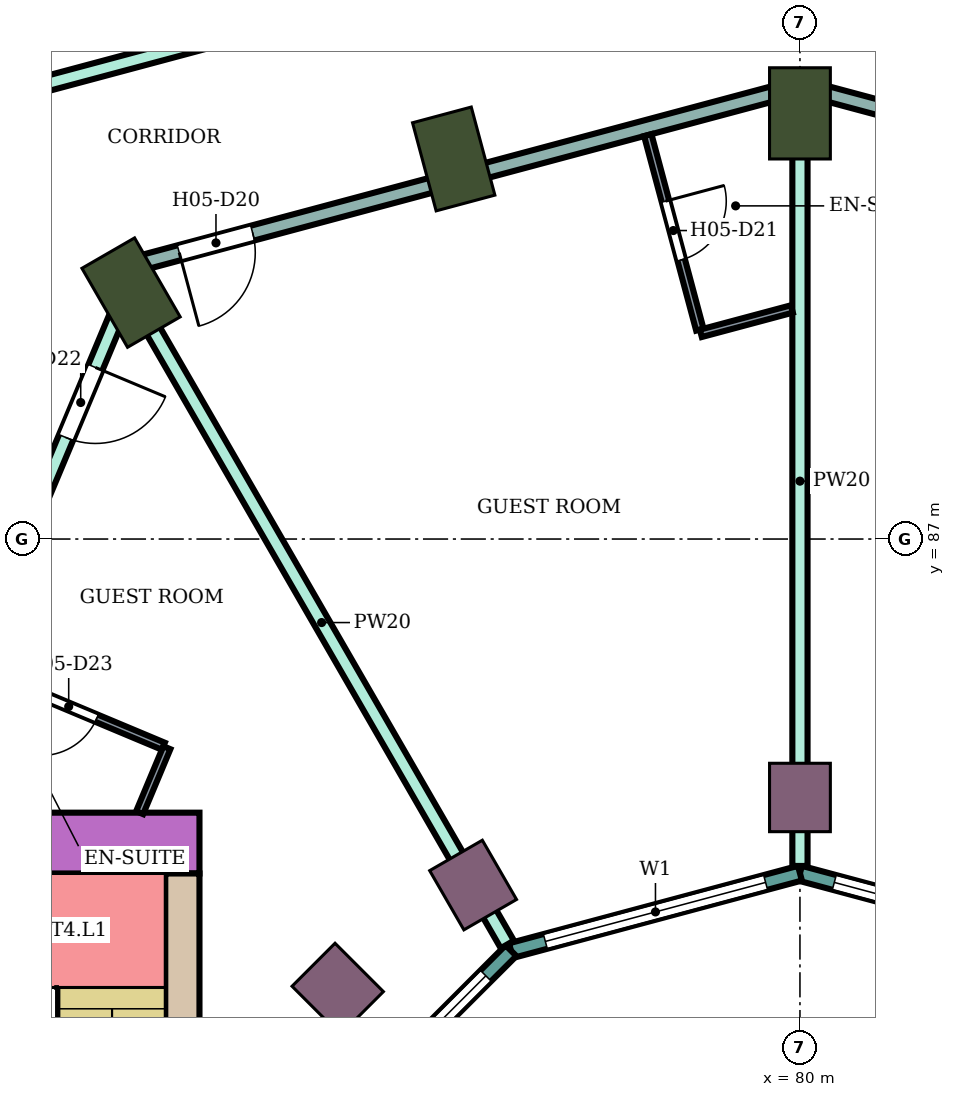
"""IFC4 building model, lengths in metres.
Left out: names, types, materials, properties, quantities, classifications, styles, units other than length and angle.
Written with IfcOpenShell. Run it as: python <this file> out.ifc"""

import sys

from ifc_helpers import new_model, si_unit, direction, frame, frame_2d, origin, origin_2d, place, context, subcontext, project, spatial, rectangle, extrude, element, fill, save


model = new_model("IFC4")
c1 = context("Model", 3, precision=1e-05, world=origin(), true_north=direction((0.0, 1.0)))
c2 = subcontext(c1, "Body", "Model", "MODEL_VIEW")
j1 = project(units=[si_unit("LENGTHUNIT", "METRE"), si_unit("PLANEANGLEUNIT", "RADIAN")], contexts=[c1])
p1 = place(None, origin())
s1 = spatial("IfcSite", under=j1, at=p1, CompositionType="ELEMENT")
p2 = place(p1, origin())
s2 = spatial("IfcBuilding", under=s1, at=p2, CompositionType="ELEMENT")
p3 = place(p2, frame((0.0, 0.0, 86.2)))
s3 = spatial("IfcBuildingStorey", under=s2, at=p3, CompositionType="ELEMENT", Elevation=86.2)
for number, where, z_axis, x_axis in (
    (1, (80.0, 92.6, 0.0), (0.0, 0.0, 1.0), (0.0, 1.0, 0.0)),
    (2, (75.445, 92.0, 0.0), (0.0, 0.0, 1.0), (-0.259, 0.966, 0.0)),
    (3, (71.2, 90.242, 0.0), (0.0, 0.0, 1.0), (-0.5, 0.866, 0.0)),
):
    element("IfcColumn", number, at=place(p3, frame(where, z_axis=z_axis, x_axis=x_axis)), inside=s3, PredefinedType="COLUMN", context=c2, shape_type="SweptSolid", body=[
        extrude(rectangle(XDim=1.2, YDim=0.8, at=origin_2d()), origin(), (0.0, 0.0, 1.0), 3.8),
    ])
for number, where, z_axis, x_axis in (
    (4, (80.0, 83.6, 0.0), (0.0, 0.0, 1.0), (0.0, 1.0, 0.0)),
    (5, (75.7, 82.448, 0.0), (0.0, 0.0, 1.0), (-0.5, 0.866, 0.0)),
    (6, (73.919, 81.081, 0.0), (0.0, 0.0, 1.0), (-0.707, 0.707, 0.0)),
):
    element("IfcColumn", number, at=place(p3, frame(where, z_axis=z_axis, x_axis=x_axis)), inside=s3, PredefinedType="COLUMN", context=c2, shape_type="SweptSolid", body=[
        extrude(rectangle(XDim=0.9, YDim=0.8, at=origin_2d()), origin(), (0.0, 0.0, 1.0), 3.8),
    ])
p4 = place(p3, frame((72.1, 83.0, 0.0), z_axis=(0.0, 0.0, 1.0), x_axis=(-1.0, 0.0, 0.0)))
e7 = element("IfcWall", 7, at=p4, inside=s3, PredefinedType="SHEAR", context=c2, shape_type="SweptSolid", body=[
    extrude(rectangle(XDim=14.7, YDim=0.8, at=frame_2d((7.35, 0.0))), origin(), (0.0, 0.0, 1.0), 3.48),
])
p5 = place(p4, frame((4.2, 0.0, 0.0)))
e8 = element("IfcOpeningElement", 8, at=p5, cuts=e7, PredefinedType="OPENING", context=c2, shape_type="SweptSolid", body=[
    extrude(rectangle(XDim=2.4, YDim=2.4, at=frame_2d((1.2, 1.2))), frame((0.0, 0.41, 0.0), z_axis=(0.0, -1.0, 0.0), x_axis=(1.0, 0.0, 0.0)), (0.0, 0.0, 1.0), 0.82),
])
p6 = place(p3, frame((71.875, 82.6, 0.0), z_axis=(0.0, 0.0, 1.0), x_axis=(0.0, -1.0, 0.0)))
e9 = element("IfcWall", 9, at=p6, inside=s3, PredefinedType="SHEAR", context=c2, shape_type="SweptSolid", body=[
    extrude(rectangle(XDim=7.6, YDim=0.45, at=frame_2d((3.8, 0.0))), origin(), (0.0, 0.0, 1.0), 3.48),
])
p7 = place(p3, frame((83.802, 81.585, 0.0), z_axis=(0.0, 0.0, 1.0), x_axis=(-0.965933654434, 0.258789828301, 0.0)))
e10 = element("IfcWall", 10, at=p7, inside=s3, PredefinedType="NOTDEFINED", context=c2, shape_type="SweptSolid", body=[
    extrude(rectangle(XDim=3.936, YDim=0.2, at=frame_2d((1.968, 0.0))), origin(), (0.0, 0.0, 1.0), 3.8),
])
p8 = place(p7, frame((0.468, 0.0, 0.9)))
e11 = element("IfcOpeningElement", 11, at=p8, cuts=e10, PredefinedType="OPENING", context=c2, shape_type="SweptSolid", body=[
    extrude(rectangle(XDim=3.0, YDim=2.3, at=frame_2d((1.5, 1.15))), frame((0.0, 0.11, 0.0), z_axis=(0.0, -1.0, 0.0), x_axis=(1.0, 0.0, 0.0)), (0.0, 0.0, 1.0), 0.22),
])
p9 = place(p3, frame((80.0, 82.604, 0.0), z_axis=(0.0, 0.0, 1.0), x_axis=(-0.965933654434, -0.258789828301, 0.0)))
e12 = element("IfcWall", 12, at=p9, inside=s3, PredefinedType="NOTDEFINED", context=c2, shape_type="SweptSolid", body=[
    extrude(rectangle(XDim=3.936, YDim=0.2, at=frame_2d((1.968, 0.0))), origin(), (0.0, 0.0, 1.0), 3.8),
])
p10 = place(p9, frame((0.468, 0.0, 0.9)))
e13 = element("IfcOpeningElement", 13, at=p10, cuts=e12, PredefinedType="OPENING", context=c2, shape_type="SweptSolid", body=[
    extrude(rectangle(XDim=3.0, YDim=2.3, at=frame_2d((1.5, 1.15))), frame((0.0, 0.11, 0.0), z_axis=(0.0, -1.0, 0.0), x_axis=(1.0, 0.0, 0.0)), (0.0, 0.0, 1.0), 0.22),
])
p11 = place(p3, frame((76.198, 81.585, 0.0), z_axis=(0.0, 0.0, 1.0), x_axis=(-0.707106781187, -0.707106781187, 0.0)))
e14 = element("IfcWall", 14, at=p11, inside=s3, PredefinedType="NOTDEFINED", context=c2, shape_type="SweptSolid", body=[
    extrude(rectangle(XDim=3.936, YDim=0.2, at=frame_2d((1.968, 0.0))), origin(), (0.0, 0.0, 1.0), 3.8),
])
p12 = place(p11, frame((0.468, 0.0, 0.9)))
e15 = element("IfcOpeningElement", 15, at=p12, cuts=e14, PredefinedType="OPENING", context=c2, shape_type="SweptSolid", body=[
    extrude(rectangle(XDim=3.0, YDim=2.3, at=frame_2d((1.5, 1.15))), frame((0.0, 0.11, 0.0), z_axis=(0.0, -1.0, 0.0), x_axis=(1.0, 0.0, 0.0)), (0.0, 0.0, 1.0), 0.22),
])
p13 = place(p3, frame((68.277, 83.4, 0.0), z_axis=(0.0, 0.0, 1.0), x_axis=(0.386454861164, 0.922308321703, 0.0)))
e16 = element("IfcWall", 16, at=p13, inside=s3, PredefinedType="PARTITIONING", context=c2, shape_type="SweptSolid", body=[
    extrude(rectangle(XDim=7.762, YDim=0.2, at=frame_2d((3.881, 0.0))), origin(), (0.0, 0.0, 1.0), 3.35),
])
p14 = place(p13, frame((5.351, 0.0, 0.0)))
e17 = element("IfcOpeningElement", 17, at=p14, cuts=e16, PredefinedType="OPENING", context=c2, shape_type="SweptSolid", body=[
    extrude(rectangle(XDim=1.0, YDim=2.1, at=frame_2d((0.5, 1.05))), frame((0.0, 0.11, 0.0), z_axis=(0.0, -1.0, 0.0), x_axis=(1.0, 0.0, 0.0)), (0.0, 0.0, 1.0), 0.22),
])
p15 = place(p3, frame((69.397, 92.805, 0.0), z_axis=(0.0, 0.0, 1.0), x_axis=(0.96596468683, 0.258673972015, 0.0)))
e18 = element("IfcWall", 18, at=p15, inside=s3, PredefinedType="PARTITIONING", context=c2, shape_type="SweptSolid", body=[
    extrude(rectangle(XDim=10.937, YDim=0.2, at=frame_2d((5.469, 0.0))), origin(), (0.0, 0.0, 1.0), 3.35),
])
p16 = place(p15, frame((6.163, 0.0, 0.0)))
e19 = element("IfcOpeningElement", 19, at=p16, cuts=e18, PredefinedType="OPENING", context=c2, shape_type="SweptSolid", body=[
    extrude(rectangle(XDim=1.0, YDim=2.1, at=frame_2d((0.5, 1.05))), frame((0.0, 0.11, 0.0), z_axis=(0.0, -1.0, 0.0), x_axis=(1.0, 0.0, 0.0)), (0.0, 0.0, 1.0), 0.22),
])
p17 = place(p15, frame((4.103, 0.0, 0.0)))
e20 = element("IfcOpeningElement", 20, at=p17, cuts=e18, PredefinedType="OPENING", context=c2, shape_type="SweptSolid", body=[
    extrude(rectangle(XDim=1.0, YDim=2.1, at=frame_2d((0.5, 1.05))), frame((0.0, 0.11, 0.0), z_axis=(0.0, -1.0, 0.0), x_axis=(1.0, 0.0, 0.0)), (0.0, 0.0, 1.0), 0.22),
])
p18 = place(p3, frame((71.264, 90.135, 0.0), z_axis=(0.0, 0.0, 1.0), x_axis=(0.499791624077, -0.866145676259, 0.0)))
e21 = element("IfcWall", 21, at=p18, inside=s3, PredefinedType="PARTITIONING", context=c2, shape_type="SweptSolid", body=[
    extrude(rectangle(XDim=9.778, YDim=0.2, at=frame_2d((4.889, 0.0))), origin(), (0.0, 0.0, 1.0), 3.35),
])
p19 = place(p3, frame((71.303, 90.625, 0.0), z_axis=(0.0, 0.0, 1.0), x_axis=(0.965971868307, 0.258647152776, 0.0)))
e22 = element("IfcWall", 22, at=p19, inside=s3, PredefinedType="PARTITIONING", context=c2, shape_type="SweptSolid", body=[
    extrude(rectangle(XDim=8.874, YDim=0.2, at=frame_2d((4.437, 0.0))), origin(), (0.0, 0.0, 1.0), 2.98),
])
p20 = place(p19, frame((0.55, 0.0, 0.0)))
e23 = element("IfcOpeningElement", 23, at=p20, cuts=e22, PredefinedType="OPENING", context=c2, shape_type="SweptSolid", body=[
    extrude(rectangle(XDim=1.0, YDim=2.1, at=frame_2d((0.5, 1.05))), frame((0.0, 0.11, 0.0), z_axis=(0.0, -1.0, 0.0), x_axis=(1.0, 0.0, 0.0)), (0.0, 0.0, 1.0), 0.22),
])
p21 = place(p3, frame((80.0, 82.699, 0.0), z_axis=(0.0, 0.0, 1.0), x_axis=(0.0, 1.0, 0.0)))
e24 = element("IfcWall", 24, at=p21, inside=s3, PredefinedType="PARTITIONING", context=c2, shape_type="SweptSolid", body=[
    extrude(rectangle(XDim=10.125, YDim=0.2, at=frame_2d((5.062, 0.0))), origin(), (0.0, 0.0, 1.0), 3.35),
])
p22 = place(p3, frame((80.0, 92.954, 0.0), z_axis=(0.0, 0.0, 1.0), x_axis=(0.965932194462, -0.258795277586, 0.0)))
e25 = element("IfcWall", 25, at=p22, inside=s3, PredefinedType="PARTITIONING", context=c2, shape_type="SweptSolid", body=[
    extrude(rectangle(XDim=8.934, YDim=0.2, at=frame_2d((4.467, 0.0))), origin(), (0.0, 0.0, 1.0), 2.98),
])
p23 = place(p22, frame((3.302, 0.0, 0.0)))
e26 = element("IfcOpeningElement", 26, at=p23, cuts=e25, PredefinedType="OPENING", context=c2, shape_type="SweptSolid", body=[
    extrude(rectangle(XDim=0.9, YDim=2.1, at=frame_2d((0.45, 1.05))), frame((0.0, 0.11, 0.0), z_axis=(0.0, -1.0, 0.0), x_axis=(1.0, 0.0, 0.0)), (0.0, 0.0, 1.0), 0.22),
])
p24 = place(p3, frame((80.0, 95.648, 0.0), z_axis=(0.0, 0.0, 1.0), x_axis=(0.965852259202, -0.259093445292, 0.0)))
e27 = element("IfcWall", 27, at=p24, inside=s3, PredefinedType="PARTITIONING", context=c2, shape_type="SweptSolid", body=[
    extrude(rectangle(XDim=10.597, YDim=0.2, at=frame_2d((5.298, 0.0))), origin(), (0.0, 0.0, 1.0), 3.35),
])
p25 = place(p24, frame((5.875, 0.0, 0.0)))
e28 = element("IfcOpeningElement", 28, at=p25, cuts=e27, PredefinedType="OPENING", context=c2, shape_type="SweptSolid", body=[
    extrude(rectangle(XDim=1.0, YDim=2.1, at=frame_2d((0.5, 1.05))), frame((0.0, 0.11, 0.0), z_axis=(0.0, -1.0, 0.0), x_axis=(1.0, 0.0, 0.0)), (0.0, 0.0, 1.0), 0.22),
])
p26 = place(p3, frame((69.181, 85.298, 0.0), z_axis=(0.0, 0.0, 1.0), x_axis=(0.922377635784, -0.38628939541, 0.0)))
e29 = element("IfcWall", 29, at=p26, inside=s3, PredefinedType="PARTITIONING", context=c2, shape_type="SweptSolid", body=[
    extrude(rectangle(XDim=2.65, YDim=0.1, at=frame_2d((1.325, 0.0))), origin(), (0.0, 0.0, 1.0), 3.35),
])
p27 = place(p26, frame((0.9, 0.0, 0.0)))
e30 = element("IfcOpeningElement", 30, at=p27, cuts=e29, PredefinedType="OPENING", context=c2, shape_type="SweptSolid", body=[
    extrude(rectangle(XDim=0.8, YDim=2.1, at=frame_2d((0.4, 1.05))), frame((0.0, 0.06, 0.0), z_axis=(0.0, -1.0, 0.0), x_axis=(1.0, 0.0, 0.0)), (0.0, 0.0, 1.0), 0.12),
])
p28 = place(p3, frame((71.313, 83.4, 0.0), z_axis=(0.0, 0.0, 1.0), x_axis=(0.386148512695, 0.922436624459, 0.0)))
e31 = element("IfcWall", 31, at=p28, inside=s3, PredefinedType="PARTITIONING", context=c2, shape_type="SweptSolid", body=[
    extrude(rectangle(XDim=0.927, YDim=0.1, at=frame_2d((0.463, 0.0))), origin(), (0.0, 0.0, 1.0), 3.35),
])
p29 = place(p3, frame((77.998, 92.314, 0.0), z_axis=(0.0, 0.0, 1.0), x_axis=(0.258608674509, -0.965982170368, 0.0)))
e32 = element("IfcWall", 32, at=p29, inside=s3, PredefinedType="PARTITIONING", context=c2, shape_type="SweptSolid", body=[
    extrude(rectangle(XDim=2.65, YDim=0.1, at=frame_2d((1.325, 0.0))), origin(), (0.0, 0.0, 1.0), 3.35),
])
p30 = place(p29, frame((0.9, 0.0, 0.0)))
e33 = element("IfcOpeningElement", 33, at=p30, cuts=e32, PredefinedType="OPENING", context=c2, shape_type="SweptSolid", body=[
    extrude(rectangle(XDim=0.8, YDim=2.1, at=frame_2d((0.4, 1.05))), frame((0.0, 0.06, 0.0), z_axis=(0.0, -1.0, 0.0), x_axis=(1.0, 0.0, 0.0)), (0.0, 0.0, 1.0), 0.12),
])
p31 = place(p3, frame((78.696, 89.706, 0.0), z_axis=(0.0, 0.0, 1.0), x_axis=(0.966002513606, 0.258532674351, 0.0)))
e34 = element("IfcWall", 34, at=p31, inside=s3, PredefinedType="PARTITIONING", context=c2, shape_type="SweptSolid", body=[
    extrude(rectangle(XDim=1.24, YDim=0.1, at=frame_2d((0.62, 0.0))), origin(), (0.0, 0.0, 1.0), 3.35),
])
p32 = place(p8, origin())
e35 = element("IfcWindow", 35, at=p32, inside=s3, PartitioningType="SINGLE_PANEL", PredefinedType="WINDOW", context=c2, shape_type="SweptSolid", body=[
    extrude(rectangle(XDim=3.0, YDim=2.3, at=frame_2d((1.5, 1.15))), frame((0.0, 0.03, 0.0), z_axis=(0.0, -1.0, 0.0), x_axis=(1.0, 0.0, 0.0)), (0.0, 0.0, 1.0), 0.06),
])
fill(e11, e35)
p33 = place(p10, origin())
e36 = element("IfcWindow", 36, at=p33, inside=s3, PartitioningType="SINGLE_PANEL", PredefinedType="WINDOW", context=c2, shape_type="SweptSolid", body=[
    extrude(rectangle(XDim=3.0, YDim=2.3, at=frame_2d((1.5, 1.15))), frame((0.0, 0.03, 0.0), z_axis=(0.0, -1.0, 0.0), x_axis=(1.0, 0.0, 0.0)), (0.0, 0.0, 1.0), 0.06),
])
fill(e13, e36)
p34 = place(p12, origin())
e37 = element("IfcWindow", 37, at=p34, inside=s3, PartitioningType="SINGLE_PANEL", PredefinedType="WINDOW", context=c2, shape_type="SweptSolid", body=[
    extrude(rectangle(XDim=3.0, YDim=2.3, at=frame_2d((1.5, 1.15))), frame((0.0, 0.03, 0.0), z_axis=(0.0, -1.0, 0.0), x_axis=(1.0, 0.0, 0.0)), (0.0, 0.0, 1.0), 0.06),
])
fill(e15, e37)
p35 = place(p20, frame((1.0, 0.0, 0.0), z_axis=(0.0, 0.0, 1.0), x_axis=(-1.0, 0.0, 0.0)))
e38 = element("IfcDoor", 38, at=p35, inside=s3, OperationType="SINGLE_SWING_RIGHT", PredefinedType="DOOR", context=c2, shape_type="SweptSolid", body=[
    extrude(rectangle(XDim=1.0, YDim=2.1, at=frame_2d((0.5, 1.05))), frame((0.0, 0.025, 0.0), z_axis=(0.0, -1.0, 0.0), x_axis=(1.0, 0.0, 0.0)), (0.0, 0.0, 1.0), 0.05),
])
fill(e23, e38)
p36 = place(p30, origin())
e39 = element("IfcDoor", 39, at=p36, inside=s3, OperationType="SINGLE_SWING_LEFT", PredefinedType="DOOR", context=c2, shape_type="SweptSolid", body=[
    extrude(rectangle(XDim=0.8, YDim=2.1, at=frame_2d((0.4, 1.05))), frame((0.0, 0.025, 0.0), z_axis=(0.0, -1.0, 0.0), x_axis=(1.0, 0.0, 0.0)), (0.0, 0.0, 1.0), 0.05),
])
fill(e33, e39)
p37 = place(p14, frame((1.0, 0.0, 0.0), z_axis=(0.0, 0.0, 1.0), x_axis=(-1.0, 0.0, 0.0)))
e40 = element("IfcDoor", 40, at=p37, inside=s3, OperationType="SINGLE_SWING_LEFT", PredefinedType="DOOR", context=c2, shape_type="SweptSolid", body=[
    extrude(rectangle(XDim=1.0, YDim=2.1, at=frame_2d((0.5, 1.05))), frame((0.0, 0.025, 0.0), z_axis=(0.0, -1.0, 0.0), x_axis=(1.0, 0.0, 0.0)), (0.0, 0.0, 1.0), 0.05),
])
fill(e17, e40)
p38 = place(p27, frame((0.8, 0.0, 0.0), z_axis=(0.0, 0.0, 1.0), x_axis=(-1.0, 0.0, 0.0)))
e41 = element("IfcDoor", 41, at=p38, inside=s3, OperationType="SINGLE_SWING_RIGHT", PredefinedType="DOOR", context=c2, shape_type="SweptSolid", body=[
    extrude(rectangle(XDim=0.8, YDim=2.1, at=frame_2d((0.4, 1.05))), frame((0.0, 0.025, 0.0), z_axis=(0.0, -1.0, 0.0), x_axis=(1.0, 0.0, 0.0)), (0.0, 0.0, 1.0), 0.05),
])
fill(e30, e41)
save(model, sys.argv[1])
